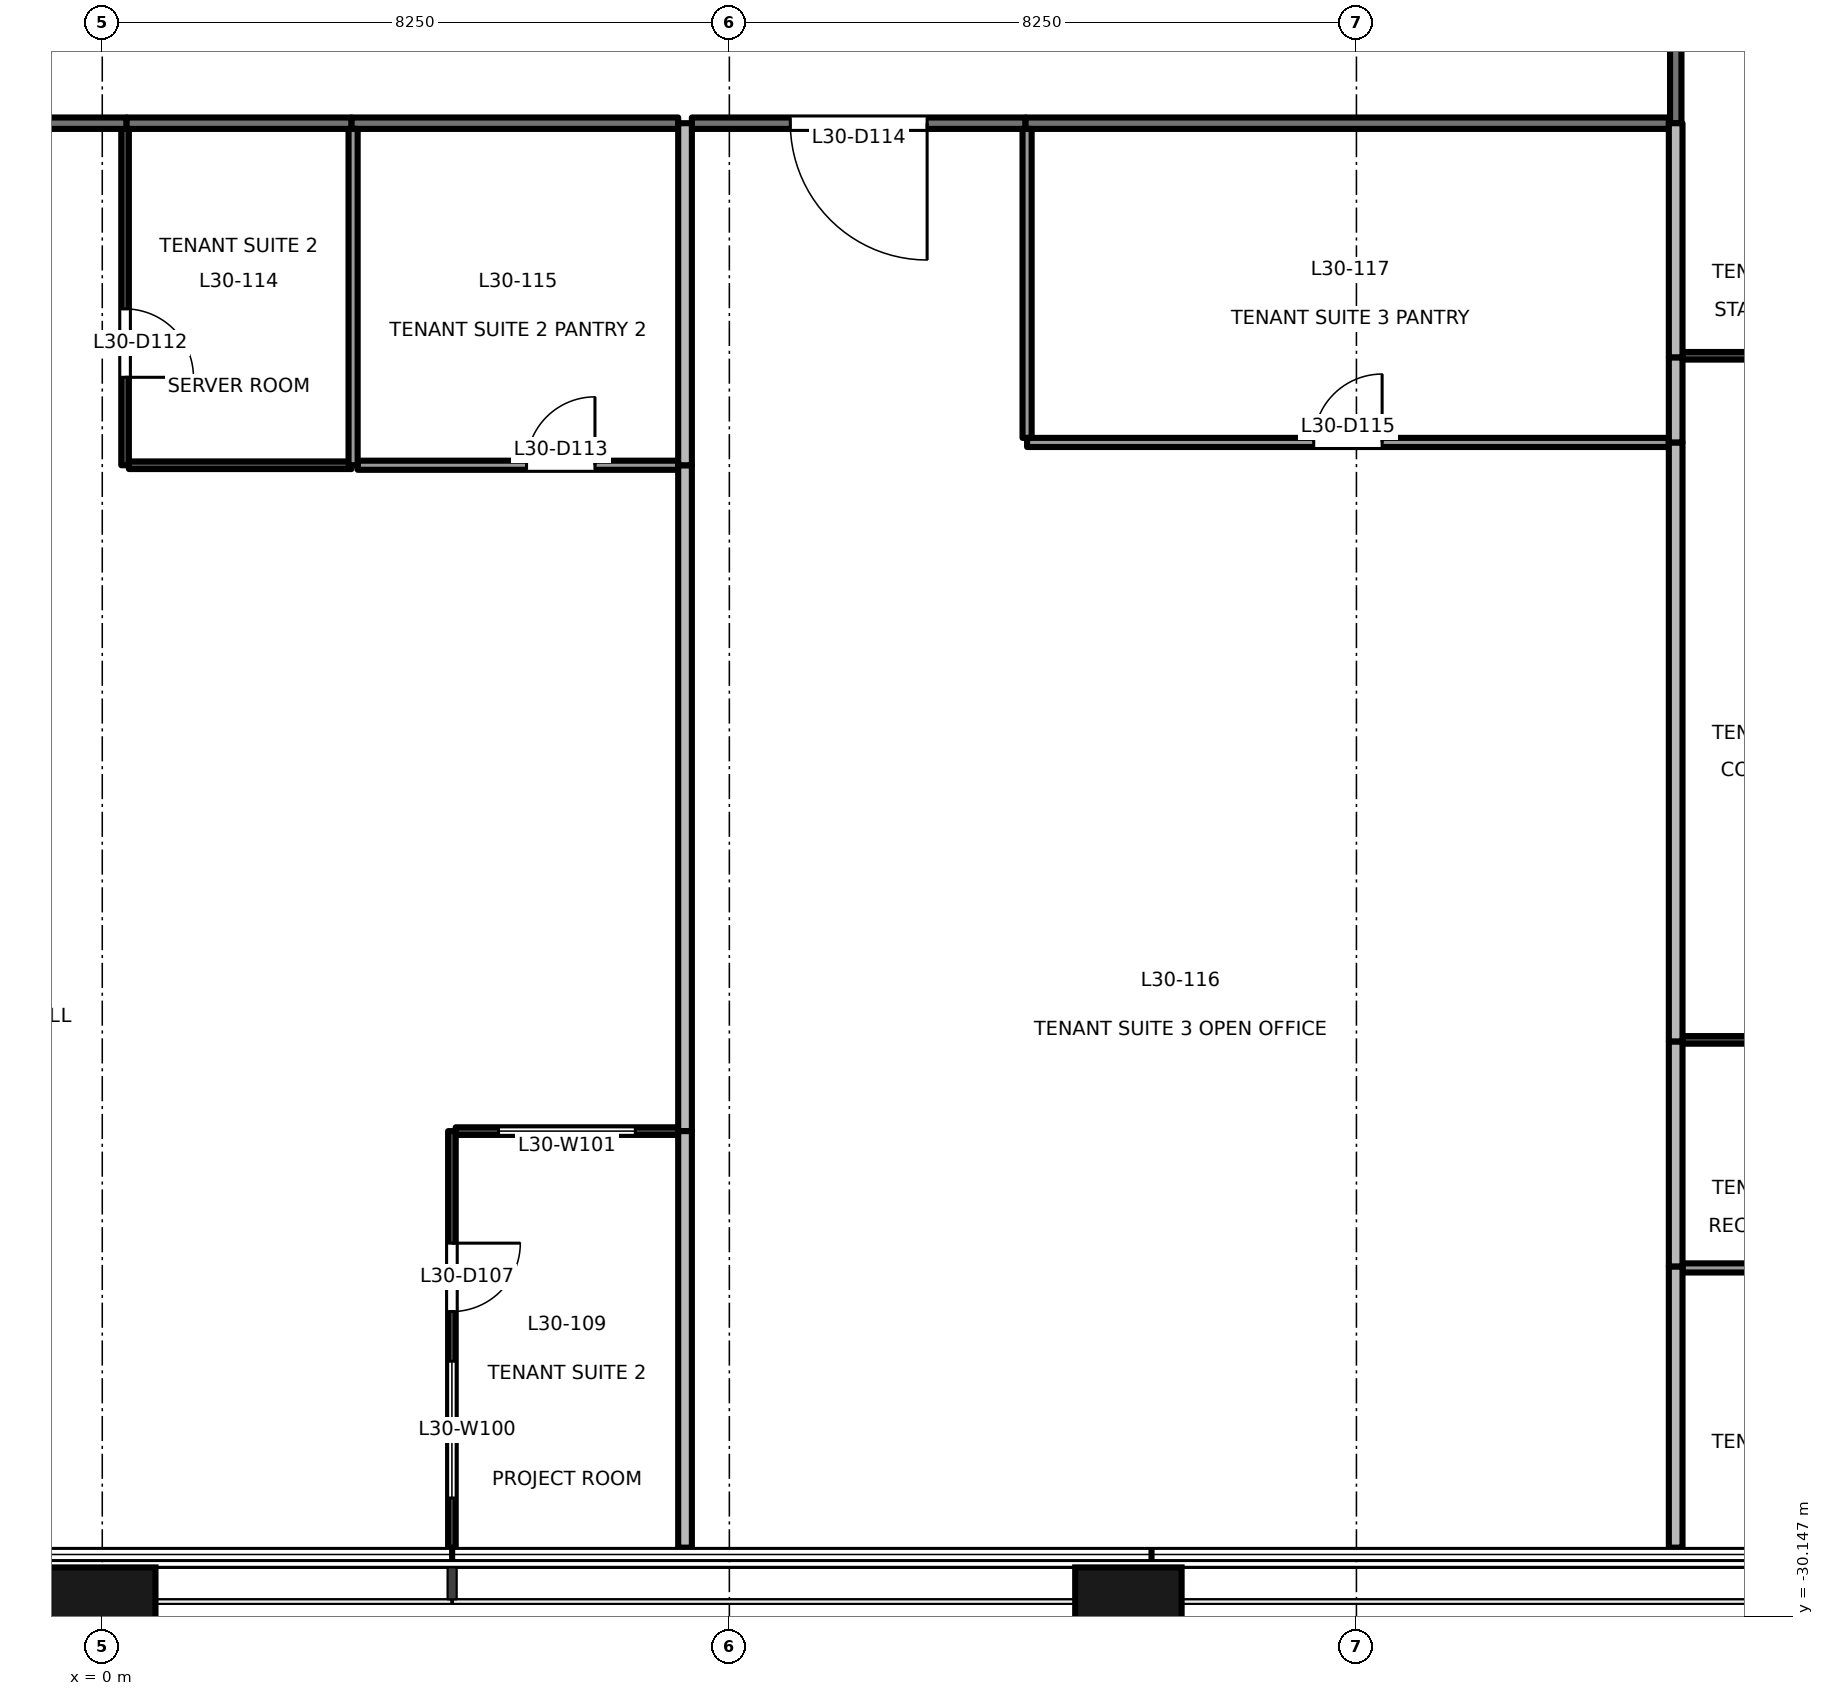
"""IFC4 building model, lengths in metres.
Left out: names, types, materials, properties, quantities, classifications, styles, units other than length and angle.
Written with IfcOpenShell. Run it as: python <this file> out.ifc"""

import sys

from ifc_helpers import new_model, si_unit, direction, frame, frame_2d, origin, origin_2d, place, context, subcontext, project, spatial, rectangle, extrude, element, fill, save


model = new_model("IFC4")
c1 = context("Model", 3, precision=1e-05, world=origin(), true_north=direction((0.0, 1.0)))
c2 = subcontext(c1, "Body", "Model", "MODEL_VIEW")
j1 = project(units=[si_unit("LENGTHUNIT", "METRE"), si_unit("PLANEANGLEUNIT", "RADIAN")], contexts=[c1])
p1 = place(None, origin())
s1 = spatial("IfcSite", under=j1, at=p1, CompositionType="ELEMENT")
p2 = place(p1, origin())
s2 = spatial("IfcBuilding", under=s1, at=p2, CompositionType="ELEMENT")
p3 = place(p2, frame((0.0, 0.0, 134.1)))
s3 = spatial("IfcBuildingStorey", under=s2, at=p3, CompositionType="ELEMENT", Elevation=134.1)
for number, where, z_axis, x_axis in (
    (1, (0.0, -30.4, -0.2), (0.0, 0.0, 1.0), (1.0, 0.0, 0.0)),
    (2, (13.5, -30.4, -0.2), (0.0, 0.0, 1.0), (1.0, 0.0, 0.0)),
):
    element("IfcColumn", number, at=place(p3, frame(where, z_axis=z_axis, x_axis=x_axis)), inside=s3, PredefinedType="COLUMN", context=c2, shape_type="SweptSolid", body=[
        extrude(rectangle(XDim=1.4, YDim=1.8, at=origin_2d()), origin(), (0.0, 0.0, 1.0), 4.0),
    ])
p4 = place(p3, frame((0.32, -10.5, 0.0), z_axis=(0.0, 0.0, 1.0), x_axis=(-1.0, 0.0, 0.0)))
e3 = element("IfcWall", 3, at=p4, inside=s3, PredefinedType="PARTITIONING", context=c2, shape_type="SweptSolid", body=[
    extrude(rectangle(XDim=6.04, YDim=0.15, at=frame_2d((3.02, 0.0))), origin(), (0.0, 0.0, 1.0), 2.9),
])
p5 = place(p4, frame((2.12, 0.0, 0.0)))
e4 = element("IfcOpeningElement", 4, at=p5, cuts=e3, PredefinedType="OPENING", context=c2, shape_type="SweptSolid", body=[
    extrude(rectangle(XDim=1.8, YDim=2.1, at=frame_2d((0.9, 1.05))), frame((0.0, 0.085, 0.0), z_axis=(0.0, -1.0, 0.0), x_axis=(1.0, 0.0, 0.0)), (0.0, 0.0, 1.0), 0.171),
])
p6 = place(p3, frame((3.28, -10.5, 0.0), z_axis=(0.0, 0.0, 1.0), x_axis=(-1.0, 0.0, 0.0)))
e5 = element("IfcWall", 5, at=p6, inside=s3, PredefinedType="PARTITIONING", context=c2, shape_type="SweptSolid", body=[
    extrude(rectangle(XDim=2.96, YDim=0.15, at=frame_2d((1.48, 0.0))), origin(), (0.0, 0.0, 1.0), 3.8),
])
p7 = place(p3, frame((7.577, -10.5, 0.0), z_axis=(0.0, 0.0, 1.0), x_axis=(-1.0, 0.0, 0.0)))
e6 = element("IfcWall", 6, at=p7, inside=s3, PredefinedType="PARTITIONING", context=c2, shape_type="SweptSolid", body=[
    extrude(rectangle(XDim=4.297, YDim=0.15, at=frame_2d((2.148, 0.0))), origin(), (0.0, 0.0, 1.0), 2.9),
])
p8 = place(p3, frame((12.147, -10.5, 0.0), z_axis=(0.0, 0.0, 1.0), x_axis=(-1.0, 0.0, 0.0)))
e7 = element("IfcWall", 7, at=p8, inside=s3, PredefinedType="PARTITIONING", context=c2, shape_type="SweptSolid", body=[
    extrude(rectangle(XDim=4.39, YDim=0.15, at=frame_2d((2.195, 0.0))), origin(), (0.0, 0.0, 1.0), 2.9),
])
p9 = place(p8, frame((1.295, 0.0, 0.0)))
e8 = element("IfcOpeningElement", 8, at=p9, cuts=e7, PredefinedType="OPENING", context=c2, shape_type="SweptSolid", body=[
    extrude(rectangle(XDim=1.8, YDim=2.1, at=frame_2d((0.9, 1.05))), frame((0.0, 0.085, 0.0), z_axis=(0.0, -1.0, 0.0), x_axis=(1.0, 0.0, 0.0)), (0.0, 0.0, 1.0), 0.171),
])
p10 = place(p3, frame((20.61, -10.5, 0.0), z_axis=(0.0, 0.0, 1.0), x_axis=(-1.0, 0.0, 0.0)))
e9 = element("IfcWall", 9, at=p10, inside=s3, PredefinedType="PARTITIONING", context=c2, shape_type="SweptSolid", body=[
    extrude(rectangle(XDim=8.463, YDim=0.15, at=frame_2d((4.231, 0.0))), origin(), (0.0, 0.0, 1.0), 2.9),
])
p11 = place(p3, frame((20.701, -8.18, 0.0), z_axis=(0.0, 0.0, 1.0), x_axis=(0.0, -1.0, 0.0)))
e10 = element("IfcWall", 10, at=p11, inside=s3, PredefinedType="PARTITIONING", context=c2, shape_type="SweptSolid", body=[
    extrude(rectangle(XDim=2.32, YDim=0.15, at=frame_2d((1.16, 0.0))), origin(), (0.0, 0.0, 1.0), 3.8),
])
p12 = place(p3, frame((4.6, -23.76, 0.0), z_axis=(0.0, 0.0, 1.0), x_axis=(0.0, -1.0, 0.0)))
e11 = element("IfcWall", 11, at=p12, inside=s3, PredefinedType="PARTITIONING", context=c2, shape_type="SweptSolid", body=[
    extrude(rectangle(XDim=5.48, YDim=0.1, at=frame_2d((2.74, 0.0))), origin(), (0.0, 0.0, 1.0), 2.9),
])
p13 = place(p12, frame((1.474, 0.0, 0.0)))
e12 = element("IfcOpeningElement", 12, at=p13, cuts=e11, PredefinedType="OPENING", context=c2, shape_type="SweptSolid", body=[
    extrude(rectangle(XDim=0.9, YDim=2.1, at=frame_2d((0.45, 1.05))), frame((0.0, 0.061, 0.0), z_axis=(0.0, -1.0, 0.0), x_axis=(1.0, 0.0, 0.0)), (0.0, 0.0, 1.0), 0.121),
])
p14 = place(p12, frame((3.027, 0.0, 0.9)))
e13 = element("IfcOpeningElement", 13, at=p14, cuts=e11, PredefinedType="OPENING", context=c2, shape_type="SweptSolid", body=[
    extrude(rectangle(XDim=1.8, YDim=1.2, at=frame_2d((0.9, 0.6))), frame((0.0, 0.061, 0.0), z_axis=(0.0, -1.0, 0.0), x_axis=(1.0, 0.0, 0.0)), (0.0, 0.0, 1.0), 0.121),
])
p15 = place(p3, frame((7.577, -23.76, 0.0), z_axis=(0.0, 0.0, 1.0), x_axis=(-1.0, 0.0, 0.0)))
e14 = element("IfcWall", 14, at=p15, inside=s3, PredefinedType="PARTITIONING", context=c2, shape_type="SweptSolid", body=[
    extrude(rectangle(XDim=2.927, YDim=0.1, at=frame_2d((1.463, 0.0))), origin(), (0.0, 0.0, 1.0), 2.9),
])
p16 = place(p15, frame((0.564, 0.0, 0.9)))
e15 = element("IfcOpeningElement", 15, at=p16, cuts=e14, PredefinedType="OPENING", context=c2, shape_type="SweptSolid", body=[
    extrude(rectangle(XDim=1.8, YDim=1.2, at=frame_2d((0.9, 0.6))), frame((0.0, 0.061, 0.0), z_axis=(0.0, -1.0, 0.0), x_axis=(1.0, 0.0, 0.0)), (0.0, 0.0, 1.0), 0.121),
])
p17 = place(p3, frame((0.3, -10.575, 0.0), z_axis=(0.0, 0.0, 1.0), x_axis=(0.0, -1.0, 0.0)))
e16 = element("IfcWall", 16, at=p17, inside=s3, PredefinedType="PARTITIONING", context=c2, shape_type="SweptSolid", body=[
    extrude(rectangle(XDim=4.425, YDim=0.1, at=frame_2d((2.212, 0.0))), origin(), (0.0, 0.0, 1.0), 3.8),
])
p18 = place(p17, frame((2.368, 0.0, 0.0)))
e17 = element("IfcOpeningElement", 17, at=p18, cuts=e16, PredefinedType="OPENING", context=c2, shape_type="SweptSolid", body=[
    extrude(rectangle(XDim=0.9, YDim=2.1, at=frame_2d((0.45, 1.05))), frame((0.0, 0.061, 0.0), z_axis=(0.0, -1.0, 0.0), x_axis=(1.0, 0.0, 0.0)), (0.0, 0.0, 1.0), 0.121),
])
p19 = place(p3, frame((0.35, -15.0, 0.0), z_axis=(0.0, 0.0, 1.0), x_axis=(1.0, 0.0, 0.0)))
e18 = element("IfcWall", 18, at=p19, inside=s3, PredefinedType="PARTITIONING", context=c2, shape_type="SweptSolid", body=[
    extrude(rectangle(XDim=2.93, YDim=0.1, at=frame_2d((1.465, 0.0))), origin(), (0.0, 0.0, 1.0), 3.8),
])
p20 = place(p3, frame((3.36, -15.0, 0.0), z_axis=(0.0, 0.0, 1.0), x_axis=(1.0, 0.0, 0.0)))
e19 = element("IfcWall", 19, at=p20, inside=s3, PredefinedType="PARTITIONING", context=c2, shape_type="SweptSolid", body=[
    extrude(rectangle(XDim=4.217, YDim=0.12, at=frame_2d((2.108, 0.0))), origin(), (0.0, 0.0, 1.0), 2.9),
])
p21 = place(p20, frame((2.222, 0.0, 0.0)))
e20 = element("IfcOpeningElement", 20, at=p21, cuts=e19, PredefinedType="OPENING", context=c2, shape_type="SweptSolid", body=[
    extrude(rectangle(XDim=0.9, YDim=2.1, at=frame_2d((0.45, 1.05))), frame((0.0, 0.071, 0.0), z_axis=(0.0, -1.0, 0.0), x_axis=(1.0, 0.0, 0.0)), (0.0, 0.0, 1.0), 0.141),
])
p22 = place(p3, frame((7.667, -15.0, 0.0), z_axis=(0.0, 0.0, 1.0), x_axis=(0.0, -1.0, 0.0)))
e21 = element("IfcWall", 21, at=p22, inside=s3, PredefinedType="PARTITIONING", context=c2, shape_type="SweptSolid", body=[
    extrude(rectangle(XDim=8.76, YDim=0.18, at=frame_2d((4.38, 0.0))), origin(), (0.0, 0.0, 1.0), 3.8),
])
p23 = place(p3, frame((7.667, -23.76, 0.0), z_axis=(0.0, 0.0, 1.0), x_axis=(0.0, -1.0, 0.0)))
e22 = element("IfcWall", 22, at=p23, inside=s3, PredefinedType="PARTITIONING", context=c2, shape_type="SweptSolid", body=[
    extrude(rectangle(XDim=5.48, YDim=0.18, at=frame_2d((2.74, 0.0))), origin(), (0.0, 0.0, 1.0), 3.8),
])
p24 = place(p3, frame((3.3, -10.575, 0.0), z_axis=(0.0, 0.0, 1.0), x_axis=(0.0, -1.0, 0.0)))
e23 = element("IfcWall", 23, at=p24, inside=s3, PredefinedType="PARTITIONING", context=c2, shape_type="SweptSolid", body=[
    extrude(rectangle(XDim=4.425, YDim=0.12, at=frame_2d((2.212, 0.0))), origin(), (0.0, 0.0, 1.0), 3.8),
])
p25 = place(p3, frame((7.667, -10.5, 0.0), z_axis=(0.0, 0.0, 1.0), x_axis=(0.0, -1.0, 0.0)))
e24 = element("IfcWall", 24, at=p25, inside=s3, PredefinedType="PARTITIONING", context=c2, shape_type="SweptSolid", body=[
    extrude(rectangle(XDim=4.5, YDim=0.18, at=frame_2d((2.25, 0.0))), origin(), (0.0, 0.0, 1.0), 3.8),
])
p26 = place(p3, frame((12.167, -10.575, 0.0), z_axis=(0.0, 0.0, 1.0), x_axis=(0.0, -1.0, 0.0)))
e25 = element("IfcWall", 25, at=p26, inside=s3, PredefinedType="PARTITIONING", context=c2, shape_type="SweptSolid", body=[
    extrude(rectangle(XDim=4.065, YDim=0.12, at=frame_2d((2.032, 0.0))), origin(), (0.0, 0.0, 1.0), 3.8),
])
p27 = place(p3, frame((12.167, -14.7, 0.0), z_axis=(0.0, 0.0, 1.0), x_axis=(1.0, 0.0, 0.0)))
e26 = element("IfcWall", 26, at=p27, inside=s3, PredefinedType="PARTITIONING", context=c2, shape_type="SweptSolid", body=[
    extrude(rectangle(XDim=8.443, YDim=0.12, at=frame_2d((4.222, 0.0))), origin(), (0.0, 0.0, 1.0), 2.9),
])
p28 = place(p27, frame((3.771, 0.0, 0.0)))
e27 = element("IfcOpeningElement", 27, at=p28, cuts=e26, PredefinedType="OPENING", context=c2, shape_type="SweptSolid", body=[
    extrude(rectangle(XDim=0.9, YDim=2.1, at=frame_2d((0.45, 1.05))), frame((0.0, 0.071, 0.0), z_axis=(0.0, -1.0, 0.0), x_axis=(1.0, 0.0, 0.0)), (0.0, 0.0, 1.0), 0.141),
])
p29 = place(p3, frame((20.7, -25.54, 0.0), z_axis=(0.0, 0.0, 1.0), x_axis=(0.0, -1.0, 0.0)))
e28 = element("IfcWall", 28, at=p29, inside=s3, PredefinedType="PARTITIONING", context=c2, shape_type="SweptSolid", body=[
    extrude(rectangle(XDim=3.7, YDim=0.18, at=frame_2d((1.85, 0.0))), origin(), (0.0, 0.0, 1.0), 3.8),
])
p30 = place(p3, frame((20.7, -22.58, 0.0), z_axis=(0.0, 0.0, 1.0), x_axis=(0.0, -1.0, 0.0)))
e29 = element("IfcWall", 29, at=p30, inside=s3, PredefinedType="PARTITIONING", context=c2, shape_type="SweptSolid", body=[
    extrude(rectangle(XDim=2.96, YDim=0.18, at=frame_2d((1.48, 0.0))), origin(), (0.0, 0.0, 1.0), 3.8),
])
p31 = place(p3, frame((20.7, -14.7, 0.0), z_axis=(0.0, 0.0, 1.0), x_axis=(0.0, -1.0, 0.0)))
e30 = element("IfcWall", 30, at=p31, inside=s3, PredefinedType="PARTITIONING", context=c2, shape_type="SweptSolid", body=[
    extrude(rectangle(XDim=7.88, YDim=0.18, at=frame_2d((3.94, 0.0))), origin(), (0.0, 0.0, 1.0), 3.8),
])
p32 = place(p3, frame((20.7, -13.58, 0.0), z_axis=(0.0, 0.0, 1.0), x_axis=(0.0, -1.0, 0.0)))
e31 = element("IfcWall", 31, at=p32, inside=s3, PredefinedType="PARTITIONING", context=c2, shape_type="SweptSolid", body=[
    extrude(rectangle(XDim=1.12, YDim=0.18, at=frame_2d((0.56, 0.0))), origin(), (0.0, 0.0, 1.0), 3.8),
])
p33 = place(p3, frame((20.7, -10.5, 0.0), z_axis=(0.0, 0.0, 1.0), x_axis=(0.0, -1.0, 0.0)))
e32 = element("IfcWall", 32, at=p33, inside=s3, PredefinedType="PARTITIONING", context=c2, shape_type="SweptSolid", body=[
    extrude(rectangle(XDim=3.08, YDim=0.18, at=frame_2d((1.54, 0.0))), origin(), (0.0, 0.0, 1.0), 3.8),
])
p34 = place(p3, frame((20.79, -25.56, 0.0), z_axis=(0.0, 0.0, 1.0), x_axis=(1.0, 0.0, 0.0)))
e33 = element("IfcWall", 33, at=p34, inside=s3, PredefinedType="PARTITIONING", context=c2, shape_type="SweptSolid", body=[
    extrude(rectangle(XDim=2.85, YDim=0.12, at=frame_2d((1.425, 0.0))), origin(), (0.0, 0.0, 1.0), 3.8),
])
for number, where, z_axis, x_axis in (
    (34, (20.79, -22.56, 0.0), (0.0, 0.0, 1.0), (1.0, 0.0, 0.0)),
    (35, (20.79, -13.56, 0.0), (0.0, 0.0, 1.0), (1.0, 0.0, 0.0)),
):
    element("IfcWall", number, at=place(p3, frame(where, z_axis=z_axis, x_axis=x_axis)), inside=s3, PredefinedType="PARTITIONING", context=c2, shape_type="SweptSolid", body=[
        extrude(rectangle(XDim=2.86, YDim=0.1, at=frame_2d((1.43, 0.0))), origin(), (0.0, 0.0, 1.0), 3.8),
    ])
p35 = place(p13, origin())
e36 = element("IfcDoor", 36, at=p35, inside=s3, OperationType="SINGLE_SWING_LEFT", PredefinedType="DOOR", context=c2, shape_type="SweptSolid", body=[
    extrude(rectangle(XDim=0.9, YDim=2.1, at=frame_2d((0.45, 1.05))), frame((0.0, 0.025, 0.0), z_axis=(0.0, -1.0, 0.0), x_axis=(1.0, 0.0, 0.0)), (0.0, 0.0, 1.0), 0.05),
])
fill(e12, e36)
p36 = place(p18, origin())
e37 = element("IfcDoor", 37, at=p36, inside=s3, OperationType="SINGLE_SWING_RIGHT", PredefinedType="DOOR", context=c2, shape_type="SweptSolid", body=[
    extrude(rectangle(XDim=0.9, YDim=2.1, at=frame_2d((0.45, 1.05))), frame((0.0, 0.025, 0.0), z_axis=(0.0, -1.0, 0.0), x_axis=(1.0, 0.0, 0.0)), (0.0, 0.0, 1.0), 0.05),
])
fill(e17, e37)
p37 = place(p21, origin())
e38 = element("IfcDoor", 38, at=p37, inside=s3, OperationType="SINGLE_SWING_RIGHT", PredefinedType="DOOR", context=c2, shape_type="SweptSolid", body=[
    extrude(rectangle(XDim=0.9, YDim=2.1, at=frame_2d((0.45, 1.05))), frame((0.0, 0.025, 0.0), z_axis=(0.0, -1.0, 0.0), x_axis=(1.0, 0.0, 0.0)), (0.0, 0.0, 1.0), 0.05),
])
fill(e20, e38)
p38 = place(p9, origin())
e39 = element("IfcDoor", 39, at=p38, inside=s3, OperationType="DOUBLE_DOOR_SINGLE_SWING", PredefinedType="DOOR", context=c2, shape_type="SweptSolid", body=[
    extrude(rectangle(XDim=1.8, YDim=2.1, at=frame_2d((0.9, 1.05))), frame((0.0, 0.025, 0.0), z_axis=(0.0, -1.0, 0.0), x_axis=(1.0, 0.0, 0.0)), (0.0, 0.0, 1.0), 0.05),
])
fill(e8, e39)
p39 = place(p28, origin())
e40 = element("IfcDoor", 40, at=p39, inside=s3, OperationType="SINGLE_SWING_RIGHT", PredefinedType="DOOR", context=c2, shape_type="SweptSolid", body=[
    extrude(rectangle(XDim=0.9, YDim=2.1, at=frame_2d((0.45, 1.05))), frame((0.0, 0.025, 0.0), z_axis=(0.0, -1.0, 0.0), x_axis=(1.0, 0.0, 0.0)), (0.0, 0.0, 1.0), 0.05),
])
fill(e27, e40)
p40 = place(p14, origin())
e41 = element("IfcWindow", 41, at=p40, inside=s3, PartitioningType="SINGLE_PANEL", PredefinedType="WINDOW", context=c2, shape_type="SweptSolid", body=[
    extrude(rectangle(XDim=1.8, YDim=1.2, at=frame_2d((0.9, 0.6))), frame((0.0, 0.03, 0.0), z_axis=(0.0, -1.0, 0.0), x_axis=(1.0, 0.0, 0.0)), (0.0, 0.0, 1.0), 0.06),
])
fill(e13, e41)
p41 = place(p16, origin())
e42 = element("IfcWindow", 42, at=p41, inside=s3, PartitioningType="SINGLE_PANEL", PredefinedType="WINDOW", context=c2, shape_type="SweptSolid", body=[
    extrude(rectangle(XDim=1.8, YDim=1.2, at=frame_2d((0.9, 0.6))), frame((0.0, 0.03, 0.0), z_axis=(0.0, -1.0, 0.0), x_axis=(1.0, 0.0, 0.0)), (0.0, 0.0, 1.0), 0.06),
])
fill(e15, e42)
save(model, sys.argv[1])
